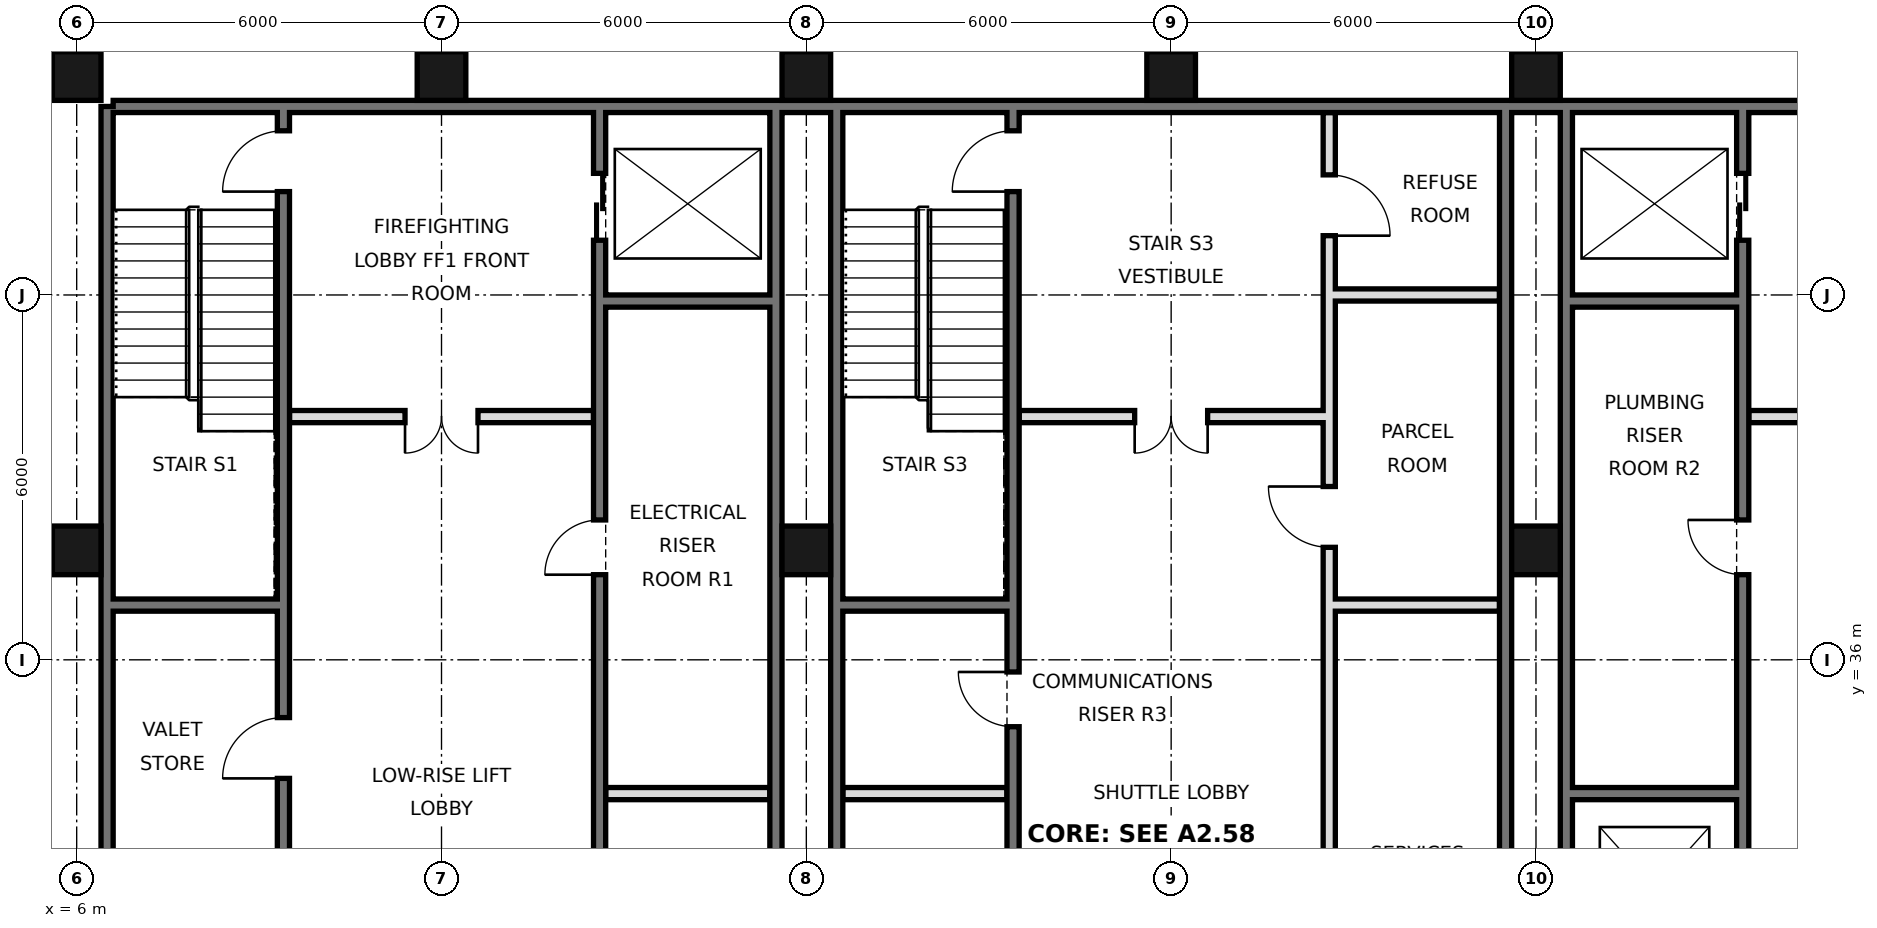
"""IFC4 building model, lengths in metres.
Left out: names, types, materials, properties, quantities, classifications, styles, units other than length and angle.
Written with IfcOpenShell. Run it as: python <this file> out.ifc"""

import sys

from ifc_helpers import new_model, si_unit, direction, frame, frame_2d, origin, origin_2d, place, context, subcontext, project, spatial, rectangle, hollow_rectangle, extrude, element, fill, save


model = new_model("IFC4")
c1 = context("Model", 3, precision=1e-05, world=origin(), true_north=direction((0.0, 1.0)))
c2 = subcontext(c1, "Body", "Model", "MODEL_VIEW")
j1 = project(units=[si_unit("LENGTHUNIT", "METRE"), si_unit("PLANEANGLEUNIT", "RADIAN")], contexts=[c1])
p1 = place(None, origin())
s1 = spatial("IfcSite", under=j1, at=p1, CompositionType="ELEMENT")
p2 = place(p1, origin())
s2 = spatial("IfcBuilding", under=s1, at=p2, CompositionType="ELEMENT")
p3 = place(p2, frame((0.0, 0.0, 229.8)))
s3 = spatial("IfcBuildingStorey", under=s2, at=p3, CompositionType="ELEMENT", Elevation=229.8)
for number, where, z_axis, x_axis in (
    (1, (6.0, 37.8, 0.0), (0.0, 0.0, 1.0), (1.0, 0.0, 0.0)),
    (2, (6.0, 45.6, 0.0), (0.0, 0.0, 1.0), (1.0, 0.0, 0.0)),
    (3, (12.0, 45.6, 0.0), (0.0, 0.0, 1.0), (1.0, 0.0, 0.0)),
    (4, (18.0, 37.8, 0.0), (0.0, 0.0, 1.0), (1.0, 0.0, 0.0)),
    (5, (18.0, 45.6, 0.0), (0.0, 0.0, 1.0), (1.0, 0.0, 0.0)),
    (6, (24.0, 45.6, 0.0), (0.0, 0.0, 1.0), (1.0, 0.0, 0.0)),
    (7, (30.0, 37.8, 0.0), (0.0, 0.0, 1.0), (1.0, 0.0, 0.0)),
    (8, (30.0, 45.6, 0.0), (0.0, 0.0, 1.0), (1.0, 0.0, 0.0)),
):
    element("IfcColumn", number, at=place(p3, frame(where, z_axis=z_axis, x_axis=x_axis)), inside=s3, PredefinedType="COLUMN", context=c2, shape_type="SweptSolid", body=[
        extrude(hollow_rectangle(XDim=0.8, YDim=0.8, WallThickness=0.04, at=origin_2d()), origin(), (0.0, 0.0, 1.0), 4.4),
    ])
p4 = place(p3, frame((6.5, 21.6, 0.0), z_axis=(0.0, 0.0, 1.0), x_axis=(0.0, 1.0, 0.0)))
e9 = element("IfcWall", 9, at=p4, inside=s3, PredefinedType="SOLIDWALL", context=c2, shape_type="SweptSolid", body=[
    extrude(rectangle(XDim=23.5, YDim=0.2, at=frame_2d((11.75, 0.0))), origin(), (0.0, 0.0, 1.0), 4.1),
])
p5 = place(p3, frame((6.6, 45.1, 0.0), z_axis=(0.0, 0.0, 1.0), x_axis=(1.0, 0.0, 0.0)))
e10 = element("IfcWall", 10, at=p5, inside=s3, PredefinedType="SOLIDWALL", context=c2, shape_type="SweptSolid", body=[
    extrude(rectangle(XDim=34.8, YDim=0.2, at=frame_2d((17.4, 0.0))), origin(), (0.0, 0.0, 1.0), 4.1),
])
for number, where, z_axis, x_axis in (
    (11, (17.5, 27.6, 0.0), (0.0, 0.0, 1.0), (0.0, 1.0, 0.0)),
    (12, (18.5, 27.6, 0.0), (0.0, 0.0, 1.0), (0.0, 1.0, 0.0)),
    (13, (29.5, 27.6, 0.0), (0.0, 0.0, 1.0), (0.0, 1.0, 0.0)),
    (14, (30.5, 27.6, 0.0), (0.0, 0.0, 1.0), (0.0, 1.0, 0.0)),
):
    element("IfcWall", number, at=place(p3, frame(where, z_axis=z_axis, x_axis=x_axis)), inside=s3, PredefinedType="SOLIDWALL", context=c2, shape_type="SweptSolid", body=[
        extrude(rectangle(XDim=17.5, YDim=0.2, at=frame_2d((8.75, 0.0))), origin(), (0.0, 0.0, 1.0), 4.1),
    ])
p6 = place(p3, frame((14.6, 27.5, 0.0), z_axis=(0.0, 0.0, 1.0), x_axis=(0.0, 1.0, 0.0)))
e15 = element("IfcWall", 15, at=p6, inside=s3, PredefinedType="SOLIDWALL", context=c2, shape_type="SweptSolid", body=[
    extrude(rectangle(XDim=17.5, YDim=0.2, at=frame_2d((8.75, 0.0))), origin(), (0.0, 0.0, 1.0), 4.1),
])
p7 = place(p6, frame((15.4, 0.0, 0.0)))
e16 = element("IfcOpeningElement", 16, at=p7, cuts=e15, PredefinedType="OPENING", context=c2, shape_type="SweptSolid", body=[
    extrude(rectangle(XDim=1.1, YDim=2.1, at=frame_2d((0.55, 1.05))), frame((0.0, 0.11, 0.0), z_axis=(0.0, -1.0, 0.0), x_axis=(1.0, 0.0, 0.0)), (0.0, 0.0, 1.0), 0.22),
])
p8 = place(p6, frame((2.7, 0.0, 0.0)))
e17 = element("IfcOpeningElement", 17, at=p8, cuts=e15, PredefinedType="OPENING", context=c2, shape_type="SweptSolid", body=[
    extrude(rectangle(XDim=1.0, YDim=2.1, at=frame_2d((0.5, 1.05))), frame((0.0, 0.11, 0.0), z_axis=(0.0, -1.0, 0.0), x_axis=(1.0, 0.0, 0.0)), (0.0, 0.0, 1.0), 0.22),
])
p9 = place(p6, frame((9.9, 0.0, 0.0)))
e18 = element("IfcOpeningElement", 18, at=p9, cuts=e15, PredefinedType="OPENING", context=c2, shape_type="SweptSolid", body=[
    extrude(rectangle(XDim=0.9, YDim=2.1, at=frame_2d((0.45, 1.05))), frame((0.0, 0.11, 0.0), z_axis=(0.0, -1.0, 0.0), x_axis=(1.0, 0.0, 0.0)), (0.0, 0.0, 1.0), 0.22),
])
p10 = place(p3, frame((21.4, 27.5, 0.0), z_axis=(0.0, 0.0, 1.0), x_axis=(0.0, 1.0, 0.0)))
e19 = element("IfcWall", 19, at=p10, inside=s3, PredefinedType="SOLIDWALL", context=c2, shape_type="SweptSolid", body=[
    extrude(rectangle(XDim=17.5, YDim=0.2, at=frame_2d((8.75, 0.0))), origin(), (0.0, 0.0, 1.0), 4.1),
])
p11 = place(p10, frame((0.55, 0.0, 0.0)))
e20 = element("IfcOpeningElement", 20, at=p11, cuts=e19, PredefinedType="OPENING", context=c2, shape_type="SweptSolid", body=[
    extrude(rectangle(XDim=1.0, YDim=2.1, at=frame_2d((0.5, 1.05))), frame((0.0, 0.11, 0.0), z_axis=(0.0, -1.0, 0.0), x_axis=(1.0, 0.0, 0.0)), (0.0, 0.0, 1.0), 0.22),
])
p12 = place(p10, frame((3.65, 0.0, 0.0)))
e21 = element("IfcOpeningElement", 21, at=p12, cuts=e19, PredefinedType="OPENING", context=c2, shape_type="SweptSolid", body=[
    extrude(rectangle(XDim=1.0, YDim=2.1, at=frame_2d((0.5, 1.05))), frame((0.0, 0.11, 0.0), z_axis=(0.0, -1.0, 0.0), x_axis=(1.0, 0.0, 0.0)), (0.0, 0.0, 1.0), 0.22),
])
p13 = place(p10, frame((16.2, 0.0, 0.0)))
e22 = element("IfcOpeningElement", 22, at=p13, cuts=e19, PredefinedType="OPENING", context=c2, shape_type="SweptSolid", body=[
    extrude(rectangle(XDim=1.0, YDim=2.1, at=frame_2d((0.5, 1.05))), frame((0.0, 0.11, 0.0), z_axis=(0.0, -1.0, 0.0), x_axis=(1.0, 0.0, 0.0)), (0.0, 0.0, 1.0), 0.22),
])
p14 = place(p10, frame((7.4, 0.0, 0.0)))
e23 = element("IfcOpeningElement", 23, at=p14, cuts=e19, PredefinedType="OPENING", context=c2, shape_type="SweptSolid", body=[
    extrude(rectangle(XDim=0.9, YDim=2.1, at=frame_2d((0.45, 1.05))), frame((0.0, 0.11, 0.0), z_axis=(0.0, -1.0, 0.0), x_axis=(1.0, 0.0, 0.0)), (0.0, 0.0, 1.0), 0.22),
])
p15 = place(p3, frame((26.6, 27.5, 0.0), z_axis=(0.0, 0.0, 1.0), x_axis=(0.0, 1.0, 0.0)))
e24 = element("IfcWall", 24, at=p15, inside=s3, PredefinedType="SOLIDWALL", context=c2, shape_type="SweptSolid", body=[
    extrude(rectangle(XDim=17.5, YDim=0.2, at=frame_2d((8.75, 0.0))), origin(), (0.0, 0.0, 1.0), 4.1),
])
p16 = place(p15, frame((4.3, 0.0, 0.0)))
e25 = element("IfcOpeningElement", 25, at=p16, cuts=e24, PredefinedType="OPENING", context=c2, shape_type="SweptSolid", body=[
    extrude(rectangle(XDim=0.9, YDim=2.1, at=frame_2d((0.45, 1.05))), frame((0.0, 0.11, 0.0), z_axis=(0.0, -1.0, 0.0), x_axis=(1.0, 0.0, 0.0)), (0.0, 0.0, 1.0), 0.22),
])
p17 = place(p15, frame((10.35, 0.0, 0.0)))
e26 = element("IfcOpeningElement", 26, at=p17, cuts=e24, PredefinedType="OPENING", context=c2, shape_type="SweptSolid", body=[
    extrude(rectangle(XDim=1.0, YDim=2.1, at=frame_2d((0.5, 1.05))), frame((0.0, 0.11, 0.0), z_axis=(0.0, -1.0, 0.0), x_axis=(1.0, 0.0, 0.0)), (0.0, 0.0, 1.0), 0.22),
])
p18 = place(p15, frame((15.475, 0.0, 0.0)))
e27 = element("IfcOpeningElement", 27, at=p18, cuts=e24, PredefinedType="OPENING", context=c2, shape_type="SweptSolid", body=[
    extrude(rectangle(XDim=1.0, YDim=2.1, at=frame_2d((0.5, 1.05))), frame((0.0, 0.11, 0.0), z_axis=(0.0, -1.0, 0.0), x_axis=(1.0, 0.0, 0.0)), (0.0, 0.0, 1.0), 0.22),
])
p19 = place(p3, frame((33.4, 27.5, 0.0), z_axis=(0.0, 0.0, 1.0), x_axis=(0.0, 1.0, 0.0)))
e28 = element("IfcWall", 28, at=p19, inside=s3, PredefinedType="SOLIDWALL", context=c2, shape_type="SweptSolid", body=[
    extrude(rectangle(XDim=17.5, YDim=0.2, at=frame_2d((8.75, 0.0))), origin(), (0.0, 0.0, 1.0), 4.1),
])
p20 = place(p19, frame((1.1, 0.0, 0.0)))
e29 = element("IfcOpeningElement", 29, at=p20, cuts=e28, PredefinedType="OPENING", context=c2, shape_type="SweptSolid", body=[
    extrude(rectangle(XDim=1.1, YDim=2.1, at=frame_2d((0.55, 1.05))), frame((0.0, 0.11, 0.0), z_axis=(0.0, -1.0, 0.0), x_axis=(1.0, 0.0, 0.0)), (0.0, 0.0, 1.0), 0.22),
])
p21 = place(p19, frame((4.2, 0.0, 0.0)))
e30 = element("IfcOpeningElement", 30, at=p21, cuts=e28, PredefinedType="OPENING", context=c2, shape_type="SweptSolid", body=[
    extrude(rectangle(XDim=1.1, YDim=2.1, at=frame_2d((0.55, 1.05))), frame((0.0, 0.11, 0.0), z_axis=(0.0, -1.0, 0.0), x_axis=(1.0, 0.0, 0.0)), (0.0, 0.0, 1.0), 0.22),
])
p22 = place(p19, frame((15.4, 0.0, 0.0)))
e31 = element("IfcOpeningElement", 31, at=p22, cuts=e28, PredefinedType="OPENING", context=c2, shape_type="SweptSolid", body=[
    extrude(rectangle(XDim=1.1, YDim=2.1, at=frame_2d((0.55, 1.05))), frame((0.0, 0.11, 0.0), z_axis=(0.0, -1.0, 0.0), x_axis=(1.0, 0.0, 0.0)), (0.0, 0.0, 1.0), 0.22),
])
p23 = place(p19, frame((9.9, 0.0, 0.0)))
e32 = element("IfcOpeningElement", 32, at=p23, cuts=e28, PredefinedType="OPENING", context=c2, shape_type="SweptSolid", body=[
    extrude(rectangle(XDim=0.9, YDim=2.1, at=frame_2d((0.45, 1.05))), frame((0.0, 0.11, 0.0), z_axis=(0.0, -1.0, 0.0), x_axis=(1.0, 0.0, 0.0)), (0.0, 0.0, 1.0), 0.22),
])
p24 = place(p3, frame((9.4, 21.6, 0.0), z_axis=(0.0, 0.0, 1.0), x_axis=(0.0, 1.0, 0.0)))
e33 = element("IfcWall", 33, at=p24, inside=s3, PredefinedType="SOLIDWALL", context=c2, shape_type="SweptSolid", body=[
    extrude(rectangle(XDim=23.4, YDim=0.2, at=frame_2d((11.7, 0.0))), origin(), (0.0, 0.0, 1.0), 4.1),
])
p25 = place(p24, frame((7.8, 0.0, 0.0)))
e34 = element("IfcOpeningElement", 34, at=p25, cuts=e33, PredefinedType="OPENING", context=c2, shape_type="SweptSolid", body=[
    extrude(rectangle(XDim=1.0, YDim=2.1, at=frame_2d((0.5, 1.05))), frame((0.0, 0.11, 0.0), z_axis=(0.0, -1.0, 0.0), x_axis=(1.0, 0.0, 0.0)), (0.0, 0.0, 1.0), 0.22),
])
p26 = place(p24, frame((12.45, 0.0, 0.0)))
e35 = element("IfcOpeningElement", 35, at=p26, cuts=e33, PredefinedType="OPENING", context=c2, shape_type="SweptSolid", body=[
    extrude(rectangle(XDim=1.0, YDim=2.1, at=frame_2d((0.5, 1.05))), frame((0.0, 0.11, 0.0), z_axis=(0.0, -1.0, 0.0), x_axis=(1.0, 0.0, 0.0)), (0.0, 0.0, 1.0), 0.22),
])
p27 = place(p24, frame((22.1, 0.0, 0.0)))
e36 = element("IfcOpeningElement", 36, at=p27, cuts=e33, PredefinedType="OPENING", context=c2, shape_type="SweptSolid", body=[
    extrude(rectangle(XDim=1.0, YDim=2.1, at=frame_2d((0.5, 1.05))), frame((0.0, 0.11, 0.0), z_axis=(0.0, -1.0, 0.0), x_axis=(1.0, 0.0, 0.0)), (0.0, 0.0, 1.0), 0.22),
])
p28 = place(p24, frame((0.175, 0.0, 0.0)))
e37 = element("IfcOpeningElement", 37, at=p28, cuts=e33, PredefinedType="OPENING", context=c2, shape_type="SweptSolid", body=[
    extrude(rectangle(XDim=0.9, YDim=2.1, at=frame_2d((0.45, 1.05))), frame((0.0, 0.11, 0.0), z_axis=(0.0, -1.0, 0.0), x_axis=(1.0, 0.0, 0.0)), (0.0, 0.0, 1.0), 0.22),
])
for number, where, z_axis, x_axis in (
    (38, (14.7, 33.8, 0.0), (0.0, 0.0, 1.0), (1.0, 0.0, 0.0)),
    (39, (18.6, 33.8, 0.0), (0.0, 0.0, 1.0), (1.0, 0.0, 0.0)),
    (40, (30.6, 33.8, 0.0), (0.0, 0.0, 1.0), (1.0, 0.0, 0.0)),
    (41, (18.6, 36.9, 0.0), (0.0, 0.0, 1.0), (1.0, 0.0, 0.0)),
    (42, (26.7, 36.9, 0.0), (0.0, 0.0, 1.0), (1.0, 0.0, 0.0)),
    (43, (6.6, 36.9, 0.0), (0.0, 0.0, 1.0), (1.0, 0.0, 0.0)),
):
    element("IfcWall", number, at=place(p3, frame(where, z_axis=z_axis, x_axis=x_axis)), inside=s3, PredefinedType="SOLIDWALL", context=c2, shape_type="SweptSolid", body=[
        extrude(rectangle(XDim=2.7, YDim=0.2, at=frame_2d((1.35, 0.0))), origin(), (0.0, 0.0, 1.0), 4.1),
    ])
p29 = place(p3, frame((21.5, 40.0, 0.0), z_axis=(0.0, 0.0, 1.0), x_axis=(1.0, 0.0, 0.0)))
e44 = element("IfcWall", 44, at=p29, inside=s3, PredefinedType="PARTITIONING", context=c2, shape_type="SweptSolid", body=[
    extrude(rectangle(XDim=5.0, YDim=0.2, at=frame_2d((2.5, 0.0))), origin(), (0.0, 0.0, 1.0), 4.1),
])
p30 = place(p29, frame((1.9, 0.0, 0.0)))
e45 = element("IfcOpeningElement", 45, at=p30, cuts=e44, PredefinedType="OPENING", context=c2, shape_type="SweptSolid", body=[
    extrude(rectangle(XDim=1.2, YDim=2.1, at=frame_2d((0.6, 1.05))), frame((0.0, 0.11, 0.0), z_axis=(0.0, -1.0, 0.0), x_axis=(1.0, 0.0, 0.0)), (0.0, 0.0, 1.0), 0.22),
])
p31 = place(p3, frame((33.5, 40.0, 0.0), z_axis=(0.0, 0.0, 1.0), x_axis=(1.0, 0.0, 0.0)))
e46 = element("IfcWall", 46, at=p31, inside=s3, PredefinedType="PARTITIONING", context=c2, shape_type="SweptSolid", body=[
    extrude(rectangle(XDim=5.0, YDim=0.2, at=frame_2d((2.5, 0.0))), origin(), (0.0, 0.0, 1.0), 4.1),
])
p32 = place(p31, frame((1.9, 0.0, 0.0)))
e47 = element("IfcOpeningElement", 47, at=p32, cuts=e46, PredefinedType="OPENING", context=c2, shape_type="SweptSolid", body=[
    extrude(rectangle(XDim=1.2, YDim=2.1, at=frame_2d((0.6, 1.05))), frame((0.0, 0.11, 0.0), z_axis=(0.0, -1.0, 0.0), x_axis=(1.0, 0.0, 0.0)), (0.0, 0.0, 1.0), 0.22),
])
p33 = place(p3, frame((9.5, 40.0, 0.0), z_axis=(0.0, 0.0, 1.0), x_axis=(1.0, 0.0, 0.0)))
e48 = element("IfcWall", 48, at=p33, inside=s3, PredefinedType="PARTITIONING", context=c2, shape_type="SweptSolid", body=[
    extrude(rectangle(XDim=5.0, YDim=0.2, at=frame_2d((2.5, 0.0))), origin(), (0.0, 0.0, 1.0), 4.1),
])
p34 = place(p33, frame((1.9, 0.0, 0.0)))
e49 = element("IfcOpeningElement", 49, at=p34, cuts=e48, PredefinedType="OPENING", context=c2, shape_type="SweptSolid", body=[
    extrude(rectangle(XDim=1.2, YDim=2.1, at=frame_2d((0.6, 1.05))), frame((0.0, 0.11, 0.0), z_axis=(0.0, -1.0, 0.0), x_axis=(1.0, 0.0, 0.0)), (0.0, 0.0, 1.0), 0.22),
])
for number, where, z_axis, x_axis in (
    (50, (14.7, 41.9, 0.0), (0.0, 0.0, 1.0), (1.0, 0.0, 0.0)),
    (51, (30.6, 41.9, 0.0), (0.0, 0.0, 1.0), (1.0, 0.0, 0.0)),
):
    element("IfcWall", number, at=place(p3, frame(where, z_axis=z_axis, x_axis=x_axis)), inside=s3, PredefinedType="SOLIDWALL", context=c2, shape_type="SweptSolid", body=[
        extrude(rectangle(XDim=2.7, YDim=0.2, at=frame_2d((1.35, 0.0))), origin(), (0.0, 0.0, 1.0), 4.1),
    ])
p35 = place(p3, frame((26.7, 42.0, 0.0), z_axis=(0.0, 0.0, 1.0), x_axis=(1.0, 0.0, 0.0)))
e52 = element("IfcWall", 52, at=p35, inside=s3, PredefinedType="PARTITIONING", context=c2, shape_type="SweptSolid", body=[
    extrude(rectangle(XDim=2.7, YDim=0.2, at=frame_2d((1.35, 0.0))), origin(), (0.0, 0.0, 1.0), 4.1),
])
p36 = place(p34, frame((1.2, 0.0, 0.0), z_axis=(0.0, 0.0, 1.0), x_axis=(-1.0, 0.0, 0.0)))
e53 = element("IfcDoor", 53, at=p36, inside=s3, OperationType="DOUBLE_DOOR_SINGLE_SWING", PredefinedType="DOOR", context=c2, shape_type="SweptSolid", body=[
    extrude(rectangle(XDim=1.2, YDim=2.1, at=frame_2d((0.6, 1.05))), frame((0.0, 0.025, 0.0), z_axis=(0.0, -1.0, 0.0), x_axis=(1.0, 0.0, 0.0)), (0.0, 0.0, 1.0), 0.05),
])
fill(e49, e53)
p37 = place(p30, frame((1.2, 0.0, 0.0), z_axis=(0.0, 0.0, 1.0), x_axis=(-1.0, 0.0, 0.0)))
e54 = element("IfcDoor", 54, at=p37, inside=s3, OperationType="DOUBLE_DOOR_SINGLE_SWING", PredefinedType="DOOR", context=c2, shape_type="SweptSolid", body=[
    extrude(rectangle(XDim=1.2, YDim=2.1, at=frame_2d((0.6, 1.05))), frame((0.0, 0.025, 0.0), z_axis=(0.0, -1.0, 0.0), x_axis=(1.0, 0.0, 0.0)), (0.0, 0.0, 1.0), 0.05),
])
fill(e45, e54)
p38 = place(p22, origin())
e55 = element("IfcDoor", 55, at=p38, inside=s3, OperationType="DOUBLE_DOOR_SLIDING", PredefinedType="DOOR", context=c2, shape_type="SweptSolid", body=[
    extrude(rectangle(XDim=1.1, YDim=2.1, at=frame_2d((0.55, 1.05))), frame((0.0, 0.025, 0.0), z_axis=(0.0, -1.0, 0.0), x_axis=(1.0, 0.0, 0.0)), (0.0, 0.0, 1.0), 0.05),
])
fill(e31, e55)
p39 = place(p7, origin())
e56 = element("IfcDoor", 56, at=p39, inside=s3, OperationType="DOUBLE_DOOR_SLIDING", PredefinedType="DOOR", context=c2, shape_type="SweptSolid", body=[
    extrude(rectangle(XDim=1.1, YDim=2.1, at=frame_2d((0.55, 1.05))), frame((0.0, 0.025, 0.0), z_axis=(0.0, -1.0, 0.0), x_axis=(1.0, 0.0, 0.0)), (0.0, 0.0, 1.0), 0.05),
])
fill(e16, e56)
p40 = place(p26, origin())
e57 = element("IfcDoor", 57, at=p40, inside=s3, OperationType="SINGLE_SWING_LEFT", PredefinedType="DOOR", context=c2, shape_type="SweptSolid", body=[
    extrude(rectangle(XDim=1.0, YDim=2.1, at=frame_2d((0.5, 1.05))), frame((0.0, 0.025, 0.0), z_axis=(0.0, -1.0, 0.0), x_axis=(1.0, 0.0, 0.0)), (0.0, 0.0, 1.0), 0.05),
])
fill(e35, e57)
p41 = place(p27, origin())
e58 = element("IfcDoor", 58, at=p41, inside=s3, OperationType="SINGLE_SWING_LEFT", PredefinedType="DOOR", context=c2, shape_type="SweptSolid", body=[
    extrude(rectangle(XDim=1.0, YDim=2.1, at=frame_2d((0.5, 1.05))), frame((0.0, 0.025, 0.0), z_axis=(0.0, -1.0, 0.0), x_axis=(1.0, 0.0, 0.0)), (0.0, 0.0, 1.0), 0.05),
])
fill(e36, e58)
p42 = place(p13, origin())
e59 = element("IfcDoor", 59, at=p42, inside=s3, OperationType="SINGLE_SWING_LEFT", PredefinedType="DOOR", context=c2, shape_type="SweptSolid", body=[
    extrude(rectangle(XDim=1.0, YDim=2.1, at=frame_2d((0.5, 1.05))), frame((0.0, 0.025, 0.0), z_axis=(0.0, -1.0, 0.0), x_axis=(1.0, 0.0, 0.0)), (0.0, 0.0, 1.0), 0.05),
])
fill(e22, e59)
p43 = place(p9, origin())
e60 = element("IfcDoor", 60, at=p43, inside=s3, OperationType="SINGLE_SWING_LEFT", PredefinedType="DOOR", context=c2, shape_type="SweptSolid", body=[
    extrude(rectangle(XDim=0.9, YDim=2.1, at=frame_2d((0.45, 1.05))), frame((0.0, 0.025, 0.0), z_axis=(0.0, -1.0, 0.0), x_axis=(1.0, 0.0, 0.0)), (0.0, 0.0, 1.0), 0.05),
])
fill(e18, e60)
p44 = place(p23, frame((0.9, 0.0, 0.0), z_axis=(0.0, 0.0, 1.0), x_axis=(-1.0, 0.0, 0.0)))
e61 = element("IfcDoor", 61, at=p44, inside=s3, OperationType="SINGLE_SWING_LEFT", PredefinedType="DOOR", context=c2, shape_type="SweptSolid", body=[
    extrude(rectangle(XDim=0.9, YDim=2.1, at=frame_2d((0.45, 1.05))), frame((0.0, 0.025, 0.0), z_axis=(0.0, -1.0, 0.0), x_axis=(1.0, 0.0, 0.0)), (0.0, 0.0, 1.0), 0.05),
])
fill(e32, e61)
p45 = place(p14, frame((0.9, 0.0, 0.0), z_axis=(0.0, 0.0, 1.0), x_axis=(-1.0, 0.0, 0.0)))
e62 = element("IfcDoor", 62, at=p45, inside=s3, OperationType="SINGLE_SWING_LEFT", PredefinedType="DOOR", context=c2, shape_type="SweptSolid", body=[
    extrude(rectangle(XDim=0.9, YDim=2.1, at=frame_2d((0.45, 1.05))), frame((0.0, 0.025, 0.0), z_axis=(0.0, -1.0, 0.0), x_axis=(1.0, 0.0, 0.0)), (0.0, 0.0, 1.0), 0.05),
])
fill(e23, e62)
p46 = place(p17, frame((1.0, 0.0, 0.0), z_axis=(0.0, 0.0, 1.0), x_axis=(-1.0, 0.0, 0.0)))
e63 = element("IfcDoor", 63, at=p46, inside=s3, OperationType="SINGLE_SWING_LEFT", PredefinedType="DOOR", context=c2, shape_type="SweptSolid", body=[
    extrude(rectangle(XDim=1.0, YDim=2.1, at=frame_2d((0.5, 1.05))), frame((0.0, 0.025, 0.0), z_axis=(0.0, -1.0, 0.0), x_axis=(1.0, 0.0, 0.0)), (0.0, 0.0, 1.0), 0.05),
])
fill(e26, e63)
p47 = place(p18, frame((1.0, 0.0, 0.0), z_axis=(0.0, 0.0, 1.0), x_axis=(-1.0, 0.0, 0.0)))
e64 = element("IfcDoor", 64, at=p47, inside=s3, OperationType="SINGLE_SWING_RIGHT", PredefinedType="DOOR", context=c2, shape_type="SweptSolid", body=[
    extrude(rectangle(XDim=1.0, YDim=2.1, at=frame_2d((0.5, 1.05))), frame((0.0, 0.025, 0.0), z_axis=(0.0, -1.0, 0.0), x_axis=(1.0, 0.0, 0.0)), (0.0, 0.0, 1.0), 0.05),
])
fill(e27, e64)
save(model, sys.argv[1])
